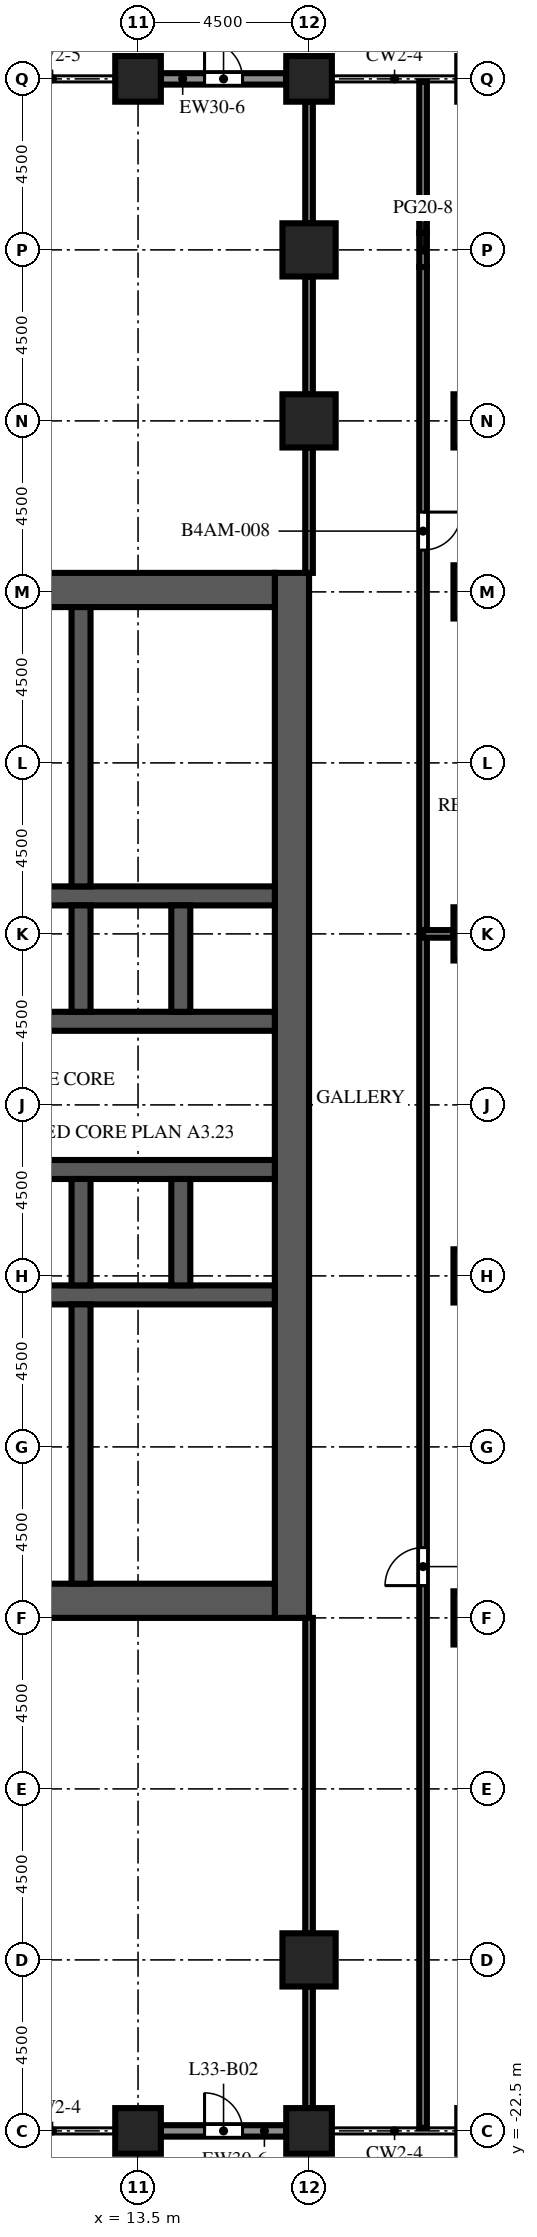
"""IFC4 building model, lengths in metres.
Left out: names, types, materials, properties, quantities, classifications, styles, units other than length and angle.
Written with IfcOpenShell. Run it as: python <this file> out.ifc"""

import sys

from ifc_helpers import new_model, si_unit, direction, frame, frame_2d, origin, origin_2d, place, context, subcontext, project, spatial, rectangle, extrude, element, fill, save


model = new_model("IFC4")
c1 = context("Model", 3, precision=1e-05, world=origin(), true_north=direction((0.0, 1.0)))
c2 = subcontext(c1, "Body", "Model", "MODEL_VIEW")
j1 = project(units=[si_unit("LENGTHUNIT", "METRE"), si_unit("PLANEANGLEUNIT", "RADIAN")], contexts=[c1])
p1 = place(None, origin())
s1 = spatial("IfcSite", under=j1, at=p1, CompositionType="ELEMENT")
p2 = place(p1, origin())
s2 = spatial("IfcBuilding", under=s1, at=p2, CompositionType="ELEMENT")
p3 = place(p2, frame((0.0, 0.0, 145.4)))
s3 = spatial("IfcBuildingStorey", under=s2, at=p3, CompositionType="ELEMENT", Elevation=145.4)
for number, where, z_axis, x_axis in (
    (1, (13.5, -22.5, 0.0), (0.0, 0.0, 1.0), (1.0, 0.0, 0.0)),
    (2, (13.5, 31.5, 0.0), (0.0, 0.0, 1.0), (1.0, 0.0, 0.0)),
    (3, (18.0, -22.5, 0.0), (0.0, 0.0, 1.0), (1.0, 0.0, 0.0)),
    (4, (18.0, 31.5, 0.0), (0.0, 0.0, 1.0), (1.0, 0.0, 0.0)),
):
    element("IfcColumn", number, at=place(p3, frame(where, z_axis=z_axis, x_axis=x_axis)), inside=s3, PredefinedType="COLUMN", context=c2, shape_type="SweptSolid", body=[
        extrude(rectangle(XDim=1.2, YDim=1.2, at=origin_2d()), origin(), (0.0, 0.0, 1.0), 6.0),
    ])
for number, where, z_axis, x_axis in (
    (5, (18.0, -18.0, 0.0), (0.0, 0.0, 1.0), (1.0, 0.0, 0.0)),
    (6, (18.0, 22.5, 0.0), (0.0, 0.0, 1.0), (1.0, 0.0, 0.0)),
):
    element("IfcColumn", number, at=place(p3, frame(where, z_axis=z_axis, x_axis=x_axis)), inside=s3, PredefinedType="COLUMN", context=c2, shape_type="SweptSolid", body=[
        extrude(rectangle(XDim=1.4, YDim=1.4, at=origin_2d()), origin(), (0.0, 0.0, 1.0), 6.0),
    ])
p4 = place(p3, frame((18.0, 27.0, 0.0), z_axis=(0.0, 0.0, 1.0), x_axis=(1.0, 0.0, 0.0)))
e7 = element("IfcColumn", 7, at=p4, inside=s3, PredefinedType="COLUMN", context=c2, shape_type="SweptSolid", body=[
    extrude(rectangle(XDim=1.4, YDim=1.4, at=origin_2d()), origin(), (0.0, 0.0, 1.0), 5.4),
])
for number, where, z_axis, x_axis in (
    (8, (22.5, -9.0, 0.0), (0.0, 0.0, 1.0), (1.0, 0.0, 0.0)),
    (9, (22.5, 0.0, 0.0), (0.0, 0.0, 1.0), (1.0, 0.0, 0.0)),
    (10, (22.5, 9.0, 0.0), (0.0, 0.0, 1.0), (1.0, 0.0, 0.0)),
    (11, (22.5, 18.0, 0.0), (0.0, 0.0, 1.0), (1.0, 0.0, 0.0)),
    (12, (22.5, 22.5, 0.0), (0.0, 0.0, 1.0), (1.0, 0.0, 0.0)),
):
    element("IfcColumn", number, at=place(p3, frame(where, z_axis=z_axis, x_axis=x_axis)), inside=s3, PredefinedType="COLUMN", context=c2, shape_type="SweptSolid", body=[
        extrude(rectangle(XDim=1.4, YDim=1.4, at=origin_2d()), origin(), (0.0, 0.0, 1.0), 6.0),
    ])
p5 = place(p3, frame((17.55, -9.0, 0.0), z_axis=(0.0, 0.0, 1.0), x_axis=(0.0, 1.0, 0.0)))
e13 = element("IfcWall", 13, at=p5, inside=s3, PredefinedType="SHEAR", context=c2, shape_type="SweptSolid", body=[
    extrude(rectangle(XDim=27.5, YDim=0.9, at=frame_2d((13.75, 0.0))), origin(), (0.0, 0.0, 1.0), 6.0),
])
p6 = place(p5, frame((12.55, 0.0, 0.0)))
e14 = element("IfcOpeningElement", 14, at=p6, cuts=e13, PredefinedType="OPENING", context=c2, shape_type="SweptSolid", body=[
    extrude(rectangle(XDim=2.4, YDim=2.4, at=frame_2d((1.2, 1.2))), frame((0.0, 0.46, 0.0), z_axis=(0.0, -1.0, 0.0), x_axis=(1.0, 0.0, 0.0)), (0.0, 0.0, 1.0), 0.92),
])
p7 = place(p5, frame((6.825, 0.0, 0.0)))
e15 = element("IfcOpeningElement", 15, at=p7, cuts=e13, PredefinedType="OPENING", context=c2, shape_type="SweptSolid", body=[
    extrude(rectangle(XDim=1.2, YDim=2.1, at=frame_2d((0.6, 1.05))), frame((0.0, 0.46, 0.0), z_axis=(0.0, -1.0, 0.0), x_axis=(1.0, 0.0, 0.0)), (0.0, 0.0, 1.0), 0.92),
])
p8 = place(p5, frame((19.475, 0.0, 0.0)))
e16 = element("IfcOpeningElement", 16, at=p8, cuts=e13, PredefinedType="OPENING", context=c2, shape_type="SweptSolid", body=[
    extrude(rectangle(XDim=1.2, YDim=2.1, at=frame_2d((0.6, 1.05))), frame((0.0, 0.46, 0.0), z_axis=(0.0, -1.0, 0.0), x_axis=(1.0, 0.0, 0.0)), (0.0, 0.0, 1.0), 0.92),
])
for number, where, z_axis, x_axis in (
    (17, (6.9, -8.55, 0.0), (0.0, 0.0, 1.0), (1.0, 0.0, 0.0)),
    (18, (6.9, 18.05, 0.0), (0.0, 0.0, 1.0), (1.0, 0.0, 0.0)),
):
    element("IfcWall", number, at=place(p3, frame(where, z_axis=z_axis, x_axis=x_axis)), inside=s3, PredefinedType="SHEAR", context=c2, shape_type="SweptSolid", body=[
        extrude(rectangle(XDim=10.2, YDim=0.9, at=frame_2d((5.1, 0.0))), origin(), (0.0, 0.0, 1.0), 6.0),
    ])
p9 = place(p3, frame((6.9, -0.5, 0.0), z_axis=(0.0, 0.0, 1.0), x_axis=(1.0, 0.0, 0.0)))
e19 = element("IfcWall", 19, at=p9, inside=s3, PredefinedType="SHEAR", context=c2, shape_type="SweptSolid", body=[
    extrude(rectangle(XDim=10.2, YDim=0.5, at=frame_2d((5.1, 0.0))), origin(), (0.0, 0.0, 1.0), 6.0),
])
p10 = place(p3, frame((6.9, 2.8, 0.0), z_axis=(0.0, 0.0, 1.0), x_axis=(1.0, 0.0, 0.0)))
e20 = element("IfcWall", 20, at=p10, inside=s3, PredefinedType="SHEAR", context=c2, shape_type="SweptSolid", body=[
    extrude(rectangle(XDim=10.2, YDim=0.5, at=frame_2d((5.1, 0.0))), origin(), (0.0, 0.0, 1.0), 6.0),
])
p11 = place(p10, frame((0.562, 0.0, 0.0)))
e21 = element("IfcOpeningElement", 21, at=p11, cuts=e20, PredefinedType="OPENING", context=c2, shape_type="SweptSolid", body=[
    extrude(rectangle(XDim=1.1, YDim=2.1, at=frame_2d((0.55, 1.05))), frame((0.0, 0.26, 0.0), z_axis=(0.0, -1.0, 0.0), x_axis=(1.0, 0.0, 0.0)), (0.0, 0.0, 1.0), 0.52),
])
p12 = place(p10, frame((3.238, 0.0, 0.0)))
e22 = element("IfcOpeningElement", 22, at=p12, cuts=e20, PredefinedType="OPENING", context=c2, shape_type="SweptSolid", body=[
    extrude(rectangle(XDim=1.1, YDim=2.1, at=frame_2d((0.55, 1.05))), frame((0.0, 0.26, 0.0), z_axis=(0.0, -1.0, 0.0), x_axis=(1.0, 0.0, 0.0)), (0.0, 0.0, 1.0), 0.52),
])
p13 = place(p10, frame((8.538, 0.0, 0.0)))
e23 = element("IfcOpeningElement", 23, at=p13, cuts=e20, PredefinedType="OPENING", context=c2, shape_type="SweptSolid", body=[
    extrude(rectangle(XDim=1.1, YDim=2.1, at=frame_2d((0.55, 1.05))), frame((0.0, 0.26, 0.0), z_axis=(0.0, -1.0, 0.0), x_axis=(1.0, 0.0, 0.0)), (0.0, 0.0, 1.0), 0.52),
])
p14 = place(p3, frame((6.9, 6.7, 0.0), z_axis=(0.0, 0.0, 1.0), x_axis=(1.0, 0.0, 0.0)))
e24 = element("IfcWall", 24, at=p14, inside=s3, PredefinedType="SHEAR", context=c2, shape_type="SweptSolid", body=[
    extrude(rectangle(XDim=10.2, YDim=0.5, at=frame_2d((5.1, 0.0))), origin(), (0.0, 0.0, 1.0), 6.0),
])
p15 = place(p14, frame((0.562, 0.0, 0.0)))
e25 = element("IfcOpeningElement", 25, at=p15, cuts=e24, PredefinedType="OPENING", context=c2, shape_type="SweptSolid", body=[
    extrude(rectangle(XDim=1.1, YDim=2.1, at=frame_2d((0.55, 1.05))), frame((0.0, 0.26, 0.0), z_axis=(0.0, -1.0, 0.0), x_axis=(1.0, 0.0, 0.0)), (0.0, 0.0, 1.0), 0.52),
])
p16 = place(p14, frame((3.288, 0.0, 0.0)))
e26 = element("IfcOpeningElement", 26, at=p16, cuts=e24, PredefinedType="OPENING", context=c2, shape_type="SweptSolid", body=[
    extrude(rectangle(XDim=1.0, YDim=2.1, at=frame_2d((0.5, 1.05))), frame((0.0, 0.26, 0.0), z_axis=(0.0, -1.0, 0.0), x_axis=(1.0, 0.0, 0.0)), (0.0, 0.0, 1.0), 0.52),
])
p17 = place(p14, frame((5.913, 0.0, 0.0)))
e27 = element("IfcOpeningElement", 27, at=p17, cuts=e24, PredefinedType="OPENING", context=c2, shape_type="SweptSolid", body=[
    extrude(rectangle(XDim=1.0, YDim=2.1, at=frame_2d((0.5, 1.05))), frame((0.0, 0.26, 0.0), z_axis=(0.0, -1.0, 0.0), x_axis=(1.0, 0.0, 0.0)), (0.0, 0.0, 1.0), 0.52),
])
p18 = place(p14, frame((8.587, 0.0, 0.0)))
e28 = element("IfcOpeningElement", 28, at=p18, cuts=e24, PredefinedType="OPENING", context=c2, shape_type="SweptSolid", body=[
    extrude(rectangle(XDim=1.0, YDim=2.1, at=frame_2d((0.5, 1.05))), frame((0.0, 0.26, 0.0), z_axis=(0.0, -1.0, 0.0), x_axis=(1.0, 0.0, 0.0)), (0.0, 0.0, 1.0), 0.52),
])
p19 = place(p3, frame((6.9, 10.0, 0.0), z_axis=(0.0, 0.0, 1.0), x_axis=(1.0, 0.0, 0.0)))
e29 = element("IfcWall", 29, at=p19, inside=s3, PredefinedType="SHEAR", context=c2, shape_type="SweptSolid", body=[
    extrude(rectangle(XDim=10.2, YDim=0.5, at=frame_2d((5.1, 0.0))), origin(), (0.0, 0.0, 1.0), 6.0),
])
for number, where, z_axis, x_axis in (
    (30, (12.0, -0.25, 0.0), (0.0, 0.0, 1.0), (0.0, 1.0, 0.0)),
    (31, (12.0, 6.95, 0.0), (0.0, 0.0, 1.0), (0.0, 1.0, 0.0)),
    (32, (14.625, -0.25, 0.0), (0.0, 0.0, 1.0), (0.0, 1.0, 0.0)),
    (33, (14.625, 6.95, 0.0), (0.0, 0.0, 1.0), (0.0, 1.0, 0.0)),
):
    element("IfcWall", number, at=place(p3, frame(where, z_axis=z_axis, x_axis=x_axis)), inside=s3, PredefinedType="SHEAR", context=c2, shape_type="SweptSolid", body=[
        extrude(rectangle(XDim=2.8, YDim=0.5, at=frame_2d((1.4, 0.0))), origin(), (0.0, 0.0, 1.0), 6.0),
    ])
for number, where, z_axis, x_axis in (
    (34, (12.0, -8.1, 0.0), (0.0, 0.0, 1.0), (0.0, 1.0, 0.0)),
    (35, (12.0, 10.25, 0.0), (0.0, 0.0, 1.0), (0.0, 1.0, 0.0)),
):
    element("IfcWall", number, at=place(p3, frame(where, z_axis=z_axis, x_axis=x_axis)), inside=s3, PredefinedType="SHEAR", context=c2, shape_type="SweptSolid", body=[
        extrude(rectangle(XDim=7.35, YDim=0.5, at=frame_2d((3.675, 0.0))), origin(), (0.0, 0.0, 1.0), 6.0),
    ])
p20 = place(p3, frame((17.4, -22.5, 0.0), z_axis=(0.0, 0.0, 1.0), x_axis=(-1.0, 0.0, 0.0)))
e36 = element("IfcWall", 36, at=p20, inside=s3, PredefinedType="SOLIDWALL", context=c2, shape_type="SweptSolid", body=[
    extrude(rectangle(XDim=3.3, YDim=0.3, at=frame_2d((1.65, 0.0))), origin(), (0.0, 0.0, 1.0), 4.5),
])
p21 = place(p20, frame((1.15, 0.0, 0.0)))
e37 = element("IfcOpeningElement", 37, at=p21, cuts=e36, PredefinedType="OPENING", context=c2, shape_type="SweptSolid", body=[
    extrude(rectangle(XDim=1.0, YDim=2.2, at=frame_2d((0.5, 1.1))), frame((0.0, 0.16, 0.0), z_axis=(0.0, -1.0, 0.0), x_axis=(1.0, 0.0, 0.0)), (0.0, 0.0, 1.0), 0.32),
])
p22 = place(p3, frame((14.1, 31.5, 0.0), z_axis=(0.0, 0.0, 1.0), x_axis=(1.0, 0.0, 0.0)))
e38 = element("IfcWall", 38, at=p22, inside=s3, PredefinedType="SOLIDWALL", context=c2, shape_type="SweptSolid", body=[
    extrude(rectangle(XDim=3.3, YDim=0.3, at=frame_2d((1.65, 0.0))), origin(), (0.0, 0.0, 1.0), 4.5),
])
p23 = place(p22, frame((1.15, 0.0, 0.0)))
e39 = element("IfcOpeningElement", 39, at=p23, cuts=e38, PredefinedType="OPENING", context=c2, shape_type="SweptSolid", body=[
    extrude(rectangle(XDim=1.0, YDim=2.2, at=frame_2d((0.5, 1.1))), frame((0.0, 0.16, 0.0), z_axis=(0.0, -1.0, 0.0), x_axis=(1.0, 0.0, 0.0)), (0.0, 0.0, 1.0), 0.32),
])
p24 = place(p3, frame((9.325, -3.69, 0.0), z_axis=(0.0, 0.0, 1.0), x_axis=(1.0, 0.0, 0.0)))
e40 = element("IfcWall", 40, at=p24, inside=s3, PredefinedType="PARTITIONING", context=c2, shape_type="SweptSolid", body=[
    extrude(rectangle(XDim=2.425, YDim=0.1, at=frame_2d((1.212, 0.0))), origin(), (0.0, 0.0, 1.0), 5.4),
])
p25 = place(p24, frame((0.712, 0.0, 0.0)))
e41 = element("IfcOpeningElement", 41, at=p25, cuts=e40, PredefinedType="OPENING", context=c2, shape_type="SweptSolid", body=[
    extrude(rectangle(XDim=1.0, YDim=2.1, at=frame_2d((0.5, 1.05))), frame((0.0, 0.06, 0.0), z_axis=(0.0, -1.0, 0.0), x_axis=(1.0, 0.0, 0.0)), (0.0, 0.0, 1.0), 0.12),
])
p26 = place(p3, frame((9.325, -2.367, 0.0), z_axis=(0.0, 0.0, 1.0), x_axis=(1.0, 0.0, 0.0)))
e42 = element("IfcWall", 42, at=p26, inside=s3, PredefinedType="PARTITIONING", context=c2, shape_type="SweptSolid", body=[
    extrude(rectangle(XDim=2.425, YDim=0.1, at=frame_2d((1.212, 0.0))), origin(), (0.0, 0.0, 1.0), 5.4),
])
p27 = place(p26, frame((0.712, 0.0, 0.0)))
e43 = element("IfcOpeningElement", 43, at=p27, cuts=e42, PredefinedType="OPENING", context=c2, shape_type="SweptSolid", body=[
    extrude(rectangle(XDim=1.0, YDim=2.1, at=frame_2d((0.5, 1.05))), frame((0.0, 0.06, 0.0), z_axis=(0.0, -1.0, 0.0), x_axis=(1.0, 0.0, 0.0)), (0.0, 0.0, 1.0), 0.12),
])
for number, where, z_axis, x_axis in (
    (44, (8.2, 12.455, 0.0), (0.0, 0.0, 1.0), (1.0, 0.0, 0.0)),
    (45, (8.2, 15.028, 0.0), (0.0, 0.0, 1.0), (1.0, 0.0, 0.0)),
):
    element("IfcWall", number, at=place(p3, frame(where, z_axis=z_axis, x_axis=x_axis)), inside=s3, PredefinedType="PARTITIONING", context=c2, shape_type="SweptSolid", body=[
        extrude(rectangle(XDim=3.55, YDim=0.1, at=frame_2d((1.775, 0.0))), origin(), (0.0, 0.0, 1.0), 5.4),
    ])
p28 = place(p3, frame((18.0, -21.9, 0.0), z_axis=(0.0, 0.0, 1.0), x_axis=(0.0, 1.0, 0.0)))
e46 = element("IfcWall", 46, at=p28, inside=s3, PredefinedType="PARTITIONING", context=c2, shape_type="SweptSolid", body=[
    extrude(rectangle(XDim=3.2, YDim=0.2, at=frame_2d((1.6, 0.0))), origin(), (0.0, 0.0, 1.0), 5.4),
])
p29 = place(p3, frame((18.0, -17.3, 0.0), z_axis=(0.0, 0.0, 1.0), x_axis=(0.0, 1.0, 0.0)))
e47 = element("IfcWall", 47, at=p29, inside=s3, PredefinedType="PARTITIONING", context=c2, shape_type="SweptSolid", body=[
    extrude(rectangle(XDim=8.3, YDim=0.2, at=frame_2d((4.15, 0.0))), origin(), (0.0, 0.0, 1.0), 5.4),
])
p30 = place(p3, frame((18.0, 18.5, 0.0), z_axis=(0.0, 0.0, 1.0), x_axis=(0.0, 1.0, 0.0)))
e48 = element("IfcWall", 48, at=p30, inside=s3, PredefinedType="PARTITIONING", context=c2, shape_type="SweptSolid", body=[
    extrude(rectangle(XDim=3.3, YDim=0.2, at=frame_2d((1.65, 0.0))), origin(), (0.0, 0.0, 1.0), 5.4),
])
p31 = place(p3, frame((18.0, 23.2, 0.0), z_axis=(0.0, 0.0, 1.0), x_axis=(0.0, 1.0, 0.0)))
e49 = element("IfcWall", 49, at=p31, inside=s3, PredefinedType="PARTITIONING", context=c2, shape_type="SweptSolid", body=[
    extrude(rectangle(XDim=3.1, YDim=0.2, at=frame_2d((1.55, 0.0))), origin(), (0.0, 0.0, 1.0), 5.4),
])
p32 = place(p3, frame((18.0, 27.7, 0.0), z_axis=(0.0, 0.0, 1.0), x_axis=(0.0, 1.0, 0.0)))
e50 = element("IfcWall", 50, at=p32, inside=s3, PredefinedType="PARTITIONING", context=c2, shape_type="SweptSolid", body=[
    extrude(rectangle(XDim=3.2, YDim=0.2, at=frame_2d((1.6, 0.0))), origin(), (0.0, 0.0, 1.0), 5.4),
])
p33 = place(p3, frame((21.0, 26.55, 0.0), z_axis=(0.0, 0.0, 1.0), x_axis=(0.0, -1.0, 0.0)))
e51 = element("IfcWall", 51, at=p33, inside=s3, PredefinedType="PARTITIONING", context=c2, shape_type="SweptSolid", body=[
    extrude(rectangle(XDim=48.97, YDim=0.2, at=frame_2d((24.485, 0.0))), origin(), (0.0, 0.0, 1.0), 5.4),
])
p34 = place(p33, frame((33.7, 0.0, 0.0)))
e52 = element("IfcOpeningElement", 52, at=p34, cuts=e51, PredefinedType="OPENING", context=c2, shape_type="SweptSolid", body=[
    extrude(rectangle(XDim=1.0, YDim=2.1, at=frame_2d((0.5, 1.05))), frame((0.0, 0.11, 0.0), z_axis=(0.0, -1.0, 0.0), x_axis=(1.0, 0.0, 0.0)), (0.0, 0.0, 1.0), 0.22),
])
p35 = place(p33, frame((6.45, 0.0, 0.0)))
e53 = element("IfcOpeningElement", 53, at=p35, cuts=e51, PredefinedType="OPENING", context=c2, shape_type="SweptSolid", body=[
    extrude(rectangle(XDim=1.0, YDim=2.1, at=frame_2d((0.5, 1.05))), frame((0.0, 0.11, 0.0), z_axis=(0.0, -1.0, 0.0), x_axis=(1.0, 0.0, 0.0)), (0.0, 0.0, 1.0), 0.22),
])
p36 = place(p3, frame((21.0, 26.55, 0.0), z_axis=(0.0, 0.0, 1.0), x_axis=(0.0, 1.0, 0.0)))
e54 = element("IfcWall", 54, at=p36, inside=s3, PredefinedType="PARTITIONING", context=c2, shape_type="SweptSolid", body=[
    extrude(rectangle(XDim=0.9, YDim=0.2, at=frame_2d((0.45, 0.0))), origin(), (0.0, 0.0, 1.0), 3.57),
])
p37 = place(p3, frame((21.0, 27.45, 0.0), z_axis=(0.0, 0.0, 1.0), x_axis=(0.0, 1.0, 0.0)))
e55 = element("IfcWall", 55, at=p37, inside=s3, PredefinedType="PARTITIONING", context=c2, shape_type="SweptSolid", body=[
    extrude(rectangle(XDim=3.97, YDim=0.2, at=frame_2d((1.985, 0.0))), origin(), (0.0, 0.0, 1.0), 5.4),
])
p38 = place(p3, frame((21.0, 9.0, 0.0), z_axis=(0.0, 0.0, 1.0), x_axis=(1.0, 0.0, 0.0)))
e56 = element("IfcWall", 56, at=p38, inside=s3, PredefinedType="PARTITIONING", context=c2, shape_type="SweptSolid", body=[
    extrude(rectangle(XDim=0.8, YDim=0.2, at=frame_2d((0.4, 0.0))), origin(), (0.0, 0.0, 1.0), 5.4),
])
p39 = place(p21, origin())
e57 = element("IfcDoor", 57, at=p39, inside=s3, OperationType="SINGLE_SWING_RIGHT", PredefinedType="DOOR", context=c2, shape_type="SweptSolid", body=[
    extrude(rectangle(XDim=1.0, YDim=2.2, at=frame_2d((0.5, 1.1))), frame((0.0, 0.025, 0.0), z_axis=(0.0, -1.0, 0.0), x_axis=(1.0, 0.0, 0.0)), (0.0, 0.0, 1.0), 0.05),
])
fill(e37, e57)
p40 = place(p23, origin())
e58 = element("IfcDoor", 58, at=p40, inside=s3, OperationType="SINGLE_SWING_LEFT", PredefinedType="DOOR", context=c2, shape_type="SweptSolid", body=[
    extrude(rectangle(XDim=1.0, YDim=2.2, at=frame_2d((0.5, 1.1))), frame((0.0, 0.025, 0.0), z_axis=(0.0, -1.0, 0.0), x_axis=(1.0, 0.0, 0.0)), (0.0, 0.0, 1.0), 0.05),
])
fill(e39, e58)
p41 = place(p13, origin())
e59 = element("IfcDoor", 59, at=p41, inside=s3, OperationType="DOUBLE_DOOR_SLIDING", PredefinedType="DOOR", context=c2, shape_type="SweptSolid", body=[
    extrude(rectangle(XDim=1.1, YDim=2.1, at=frame_2d((0.55, 1.05))), frame((0.0, 0.025, 0.0), z_axis=(0.0, -1.0, 0.0), x_axis=(1.0, 0.0, 0.0)), (0.0, 0.0, 1.0), 0.05),
])
fill(e23, e59)
p42 = place(p6, origin())
e60 = element("IfcDoor", 60, at=p42, inside=s3, OperationType="DOUBLE_DOOR_DOUBLE_SWING", PredefinedType="DOOR", context=c2, shape_type="SweptSolid", body=[
    extrude(rectangle(XDim=2.4, YDim=2.4, at=frame_2d((1.2, 1.2))), frame((0.0, 0.025, 0.0), z_axis=(0.0, -1.0, 0.0), x_axis=(1.0, 0.0, 0.0)), (0.0, 0.0, 1.0), 0.05),
])
fill(e14, e60)
p43 = place(p7, frame((1.2, 0.0, 0.0), z_axis=(0.0, 0.0, 1.0), x_axis=(-1.0, 0.0, 0.0)))
e61 = element("IfcDoor", 61, at=p43, inside=s3, OperationType="SINGLE_SWING_LEFT", PredefinedType="DOOR", context=c2, shape_type="SweptSolid", body=[
    extrude(rectangle(XDim=1.2, YDim=2.1, at=frame_2d((0.6, 1.05))), frame((0.0, 0.025, 0.0), z_axis=(0.0, -1.0, 0.0), x_axis=(1.0, 0.0, 0.0)), (0.0, 0.0, 1.0), 0.05),
])
fill(e15, e61)
p44 = place(p8, frame((1.2, 0.0, 0.0), z_axis=(0.0, 0.0, 1.0), x_axis=(-1.0, 0.0, 0.0)))
e62 = element("IfcDoor", 62, at=p44, inside=s3, OperationType="SINGLE_SWING_LEFT", PredefinedType="DOOR", context=c2, shape_type="SweptSolid", body=[
    extrude(rectangle(XDim=1.2, YDim=2.1, at=frame_2d((0.6, 1.05))), frame((0.0, 0.025, 0.0), z_axis=(0.0, -1.0, 0.0), x_axis=(1.0, 0.0, 0.0)), (0.0, 0.0, 1.0), 0.05),
])
fill(e16, e62)
p45 = place(p17, origin())
e63 = element("IfcDoor", 63, at=p45, inside=s3, OperationType="SINGLE_SWING_LEFT", PredefinedType="DOOR", context=c2, shape_type="SweptSolid", body=[
    extrude(rectangle(XDim=1.0, YDim=2.1, at=frame_2d((0.5, 1.05))), frame((0.0, 0.025, 0.0), z_axis=(0.0, -1.0, 0.0), x_axis=(1.0, 0.0, 0.0)), (0.0, 0.0, 1.0), 0.05),
])
fill(e27, e63)
p46 = place(p18, origin())
e64 = element("IfcDoor", 64, at=p46, inside=s3, OperationType="SINGLE_SWING_RIGHT", PredefinedType="DOOR", context=c2, shape_type="SweptSolid", body=[
    extrude(rectangle(XDim=1.0, YDim=2.1, at=frame_2d((0.5, 1.05))), frame((0.0, 0.025, 0.0), z_axis=(0.0, -1.0, 0.0), x_axis=(1.0, 0.0, 0.0)), (0.0, 0.0, 1.0), 0.05),
])
fill(e28, e64)
p47 = place(p34, origin())
e65 = element("IfcDoor", 65, at=p47, inside=s3, OperationType="SINGLE_SWING_RIGHT", PredefinedType="DOOR", context=c2, shape_type="SweptSolid", body=[
    extrude(rectangle(XDim=1.0, YDim=2.1, at=frame_2d((0.5, 1.05))), frame((0.0, 0.025, 0.0), z_axis=(0.0, -1.0, 0.0), x_axis=(1.0, 0.0, 0.0)), (0.0, 0.0, 1.0), 0.05),
])
fill(e52, e65)
p48 = place(p35, origin())
e66 = element("IfcDoor", 66, at=p48, inside=s3, OperationType="SINGLE_SWING_LEFT", PredefinedType="DOOR", context=c2, shape_type="SweptSolid", body=[
    extrude(rectangle(XDim=1.0, YDim=2.1, at=frame_2d((0.5, 1.05))), frame((0.0, 0.025, 0.0), z_axis=(0.0, -1.0, 0.0), x_axis=(1.0, 0.0, 0.0)), (0.0, 0.0, 1.0), 0.05),
])
fill(e53, e66)
save(model, sys.argv[1])
